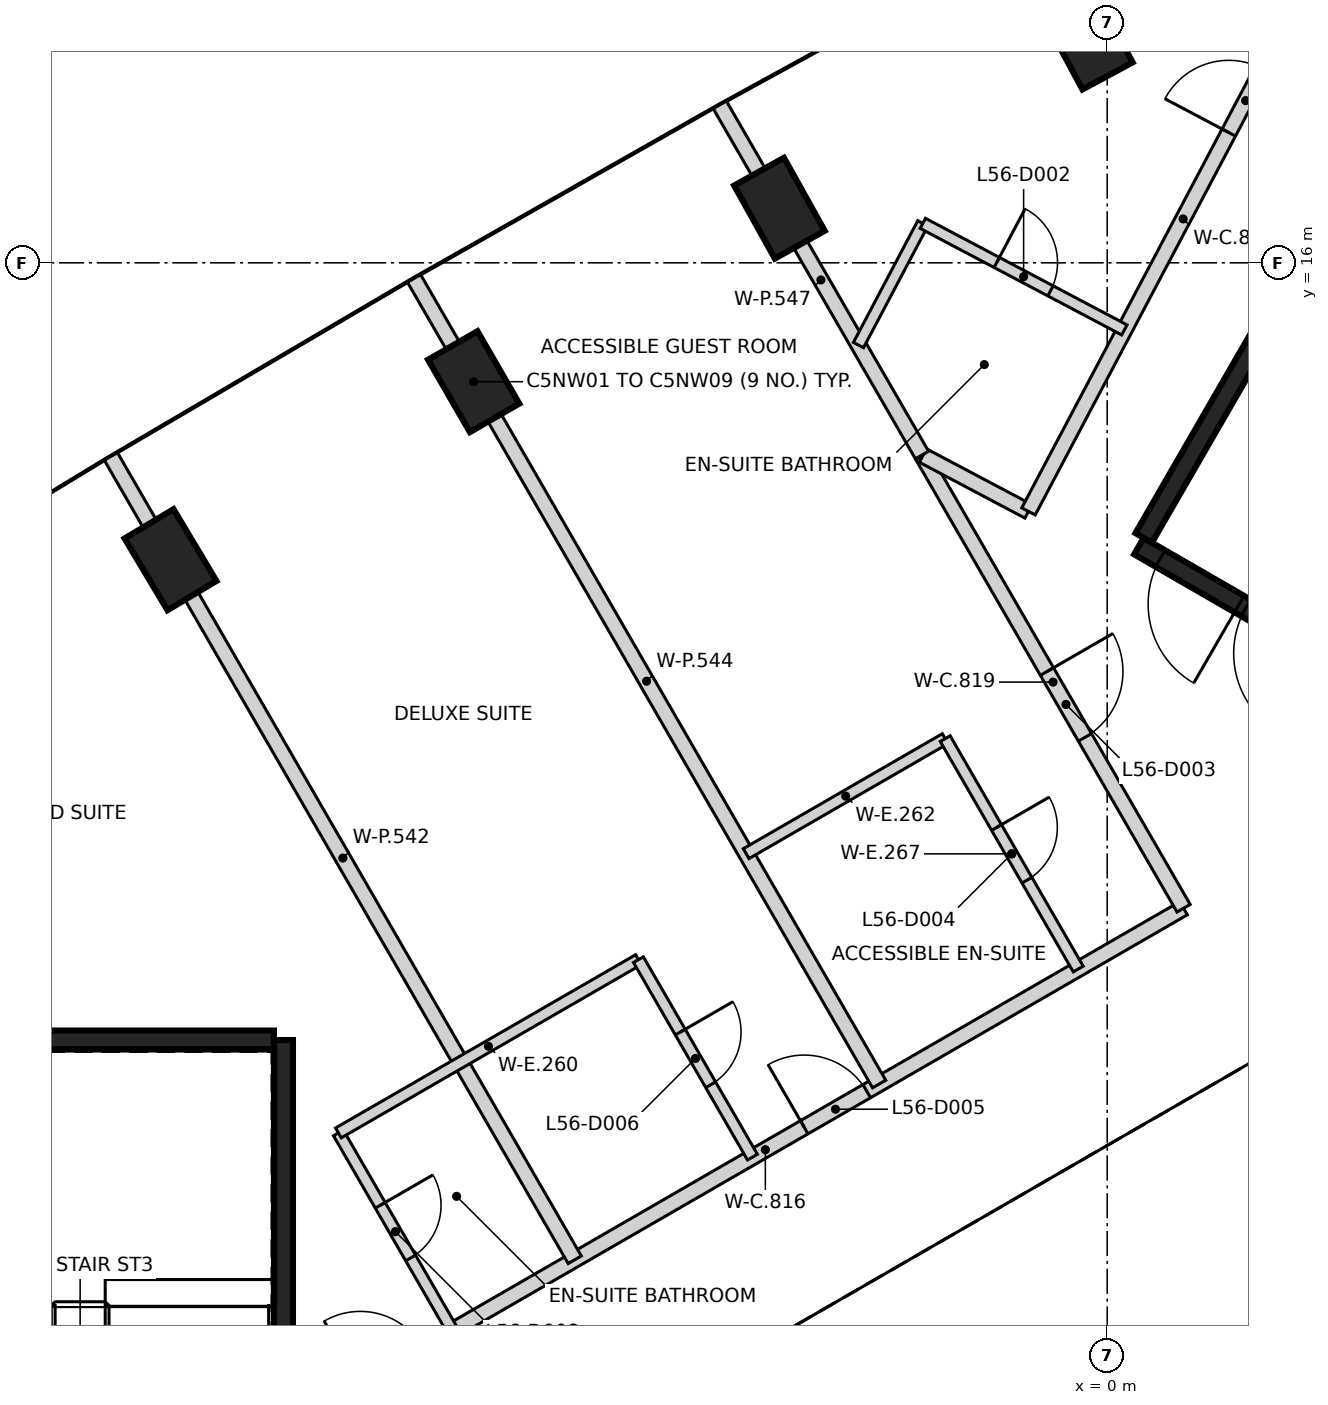
"""IFC4 building model, lengths in metres.
Left out: names, types, materials, properties, quantities, classifications, styles, units other than length and angle.
Written with IfcOpenShell. Run it as: python <this file> out.ifc"""

import sys

from ifc_helpers import new_model, si_unit, direction, frame, frame_2d, origin, origin_2d, place, context, subcontext, project, spatial, rectangle, extrude, element, fill, save


model = new_model("IFC4")
c1 = context("Model", 3, precision=1e-05, world=origin(), true_north=direction((0.0, 1.0)))
c2 = subcontext(c1, "Body", "Model", "MODEL_VIEW")
j1 = project(units=[si_unit("LENGTHUNIT", "METRE"), si_unit("PLANEANGLEUNIT", "RADIAN")], contexts=[c1])
p1 = place(None, origin())
s1 = spatial("IfcSite", under=j1, at=p1, CompositionType="ELEMENT")
p2 = place(p1, origin())
s2 = spatial("IfcBuilding", under=s1, at=p2, CompositionType="ELEMENT")
p3 = place(p2, frame((0.0, 0.0, 225.0)))
s3 = spatial("IfcBuildingStorey", under=s2, at=p3, CompositionType="ELEMENT", Elevation=225.0)
for number, where, z_axis, x_axis in (
    (1, (-0.256, 18.943, -0.35), (0.0, 0.0, 1.0), (-0.475, 0.88, 0.0)),
    (2, (-4.312, 16.719, -0.35), (0.0, 0.0, 1.0), (-0.487, 0.873, 0.0)),
    (3, (-8.335, 14.436, -0.35), (0.0, 0.0, 1.0), (-0.5, 0.866, 0.0)),
    (4, (-12.323, 12.094, -0.35), (0.0, 0.0, 1.0), (-0.513, 0.858, 0.0)),
):
    element("IfcColumn", number, at=place(p3, frame(where, z_axis=z_axis, x_axis=x_axis)), inside=s3, PredefinedType="COLUMN", context=c2, shape_type="SweptSolid", body=[
        extrude(rectangle(XDim=1.1, YDim=0.75, at=origin_2d()), origin(), (0.0, 0.0, 1.0), 3.6),
    ])
p4 = place(p3, frame((-10.837, 5.775, 0.0), z_axis=(0.0, 0.0, 1.0), x_axis=(0.0, -1.0, 0.0)))
e5 = element("IfcWall", 5, at=p4, inside=s3, PredefinedType="SHEAR", context=c2, shape_type="SweptSolid", body=[
    extrude(rectangle(XDim=11.55, YDim=0.25, at=frame_2d((5.775, 0.0))), origin(), (0.0, 0.0, 1.0), 3.25),
])
p5 = place(p4, frame((10.025, 0.0, 0.0)))
e6 = element("IfcOpeningElement", 6, at=p5, cuts=e5, PredefinedType="OPENING", context=c2, shape_type="SweptSolid", body=[
    extrude(rectangle(XDim=1.2, YDim=2.1, at=frame_2d((0.6, 1.05))), frame((0.0, 0.135, 0.0), z_axis=(0.0, -1.0, 0.0), x_axis=(1.0, 0.0, 0.0)), (0.0, 0.0, 1.0), 0.27),
])
p6 = place(p4, frame((8.725, 0.0, 0.0)))
e7 = element("IfcOpeningElement", 7, at=p6, cuts=e5, PredefinedType="OPENING", context=c2, shape_type="SweptSolid", body=[
    extrude(rectangle(XDim=1.2, YDim=2.1, at=frame_2d((0.6, 1.05))), frame((0.0, 0.135, 0.0), z_axis=(0.0, -1.0, 0.0), x_axis=(1.0, 0.0, 0.0)), (0.0, 0.0, 1.0), 0.27),
])
p7 = place(p3, frame((-16.472, 5.775, 0.0), z_axis=(0.0, 0.0, 1.0), x_axis=(1.0, 0.0, 0.0)))
e8 = element("IfcWall", 8, at=p7, inside=s3, PredefinedType="SHEAR", context=c2, shape_type="SweptSolid", body=[
    extrude(rectangle(XDim=5.51, YDim=0.25, at=frame_2d((2.755, 0.0))), origin(), (0.0, 0.0, 1.0), 3.25),
])
p8 = place(p3, frame((10.42, 6.498, 0.0), z_axis=(0.0, 0.0, 1.0), x_axis=(-0.866021906294, 0.500006057782, 0.0)))
e9 = element("IfcWall", 9, at=p8, inside=s3, PredefinedType="SHEAR", context=c2, shape_type="SweptSolid", body=[
    extrude(rectangle(XDim=11.55, YDim=0.25, at=frame_2d((5.775, 0.0))), origin(), (0.0, 0.0, 1.0), 3.25),
])
p9 = place(p8, frame((10.025, 0.0, 0.0)))
e10 = element("IfcOpeningElement", 10, at=p9, cuts=e9, PredefinedType="OPENING", context=c2, shape_type="SweptSolid", body=[
    extrude(rectangle(XDim=1.2, YDim=2.1, at=frame_2d((0.6, 1.05))), frame((0.0, 0.135, 0.0), z_axis=(0.0, -1.0, 0.0), x_axis=(1.0, 0.0, 0.0)), (0.0, 0.0, 1.0), 0.27),
])
p10 = place(p8, frame((8.725, 0.0, 0.0)))
e11 = element("IfcOpeningElement", 11, at=p10, cuts=e9, PredefinedType="OPENING", context=c2, shape_type="SweptSolid", body=[
    extrude(rectangle(XDim=1.2, YDim=2.1, at=frame_2d((0.6, 1.05))), frame((0.0, 0.135, 0.0), z_axis=(0.0, -1.0, 0.0), x_axis=(1.0, 0.0, 0.0)), (0.0, 0.0, 1.0), 0.27),
])
p11 = place(p3, frame((0.48, 12.381, 0.0), z_axis=(0.0, 0.0, 1.0), x_axis=(0.49999885962, 0.866026062182, 0.0)))
e12 = element("IfcWall", 12, at=p11, inside=s3, PredefinedType="SHEAR", context=c2, shape_type="SweptSolid", body=[
    extrude(rectangle(XDim=5.225, YDim=0.25, at=frame_2d((2.612, 0.0))), origin(), (0.0, 0.0, 1.0), 3.25),
])
p12 = place(p3, frame((-10.0, 1.155, 0.0), z_axis=(0.0, 0.0, 1.0), x_axis=(0.866014095592, 0.500019585852, 0.0)))
e13 = element("IfcWall", 13, at=p12, inside=s3, PredefinedType="PARTITIONING", context=c2, shape_type="SweptSolid", body=[
    extrude(rectangle(XDim=12.708, YDim=0.2, at=frame_2d((6.354, 0.0))), origin(), (0.0, 0.0, 1.0), 3.25),
])
p13 = place(p12, frame((6.944, 0.0, 0.0)))
e14 = element("IfcOpeningElement", 14, at=p13, cuts=e13, PredefinedType="OPENING", context=c2, shape_type="SweptSolid", body=[
    extrude(rectangle(XDim=0.95, YDim=2.1, at=frame_2d((0.475, 1.05))), frame((0.0, 0.11, 0.0), z_axis=(0.0, -1.0, 0.0), x_axis=(1.0, 0.0, 0.0)), (0.0, 0.0, 1.0), 0.22),
])
p14 = place(p12, frame((0.2, 0.0, 0.0)))
e15 = element("IfcOpeningElement", 15, at=p14, cuts=e13, PredefinedType="OPENING", context=c2, shape_type="SweptSolid", body=[
    extrude(rectangle(XDim=0.95, YDim=2.1, at=frame_2d((0.475, 1.05))), frame((0.0, 0.11, 0.0), z_axis=(0.0, -1.0, 0.0), x_axis=(1.0, 0.0, 0.0)), (0.0, 0.0, 1.0), 0.22),
])
p15 = place(p3, frame((-2.43, 13.459, 0.0), z_axis=(0.0, 0.0, 1.0), x_axis=(0.499957265187, -0.866050075334, 0.0)))
e16 = element("IfcWall", 16, at=p15, inside=s3, PredefinedType="PARTITIONING", context=c2, shape_type="SweptSolid", body=[
    extrude(rectangle(XDim=6.87, YDim=0.2, at=frame_2d((3.435, 0.0))), origin(), (0.0, 0.0, 1.0), 3.25),
])
p16 = place(p15, frame((3.275, 0.0, 0.0)))
e17 = element("IfcOpeningElement", 17, at=p16, cuts=e16, PredefinedType="OPENING", context=c2, shape_type="SweptSolid", body=[
    extrude(rectangle(XDim=1.0, YDim=2.1, at=frame_2d((0.5, 1.05))), frame((0.0, 0.11, 0.0), z_axis=(0.0, -1.0, 0.0), x_axis=(1.0, 0.0, 0.0)), (0.0, 0.0, 1.0), 0.22),
])
p17 = place(p3, frame((-2.425, 13.465, 0.0), z_axis=(0.0, 0.0, 1.0), x_axis=(0.883874806572, -0.467723557572, 0.0)))
e18 = element("IfcWall", 18, at=p17, inside=s3, PredefinedType="PARTITIONING", context=c2, shape_type="SweptSolid", body=[
    extrude(rectangle(XDim=1.572, YDim=0.2, at=frame_2d((0.786, 0.0))), origin(), (0.0, 0.0, 1.0), 3.25),
])
p18 = place(p3, frame((-1.035, 12.73, 0.0), z_axis=(0.0, 0.0, 1.0), x_axis=(0.46738248691, 0.884055208078, 0.0)))
e19 = element("IfcWall", 19, at=p18, inside=s3, PredefinedType="PARTITIONING", context=c2, shape_type="SweptSolid", body=[
    extrude(rectangle(XDim=8.705, YDim=0.2, at=frame_2d((4.352, 0.0))), origin(), (0.0, 0.0, 1.0), 3.25),
])
p19 = place(p18, frame((5.638, 0.0, 0.0)))
e20 = element("IfcOpeningElement", 20, at=p19, cuts=e19, PredefinedType="OPENING", context=c2, shape_type="SweptSolid", body=[
    extrude(rectangle(XDim=0.95, YDim=2.1, at=frame_2d((0.475, 1.05))), frame((0.0, 0.11, 0.0), z_axis=(0.0, -1.0, 0.0), x_axis=(1.0, 0.0, 0.0)), (0.0, 0.0, 1.0), 0.22),
])
p20 = place(p3, frame((-13.107, 13.453, 0.0), z_axis=(0.0, 0.0, 1.0), x_axis=(0.500037611077, -0.86600368793, 0.0)))
e21 = element("IfcWall", 21, at=p20, inside=s3, PredefinedType="PARTITIONING", context=c2, shape_type="SweptSolid", body=[
    extrude(rectangle(XDim=12.204, YDim=0.2, at=frame_2d((6.102, 0.0))), origin(), (0.0, 0.0, 1.0), 3.25),
])
p21 = place(p3, frame((-9.119, 15.795, 0.0), z_axis=(0.0, 0.0, 1.0), x_axis=(0.50001601051, -0.866016159915, 0.0)))
e22 = element("IfcWall", 22, at=p21, inside=s3, PredefinedType="PARTITIONING", context=c2, shape_type="SweptSolid", body=[
    extrude(rectangle(XDim=12.238, YDim=0.2, at=frame_2d((6.119, 0.0))), origin(), (0.0, 0.0, 1.0), 3.25),
])
p22 = place(p3, frame((-5.097, 18.078, 0.0), z_axis=(0.0, 0.0, 1.0), x_axis=(0.50004820116, -0.865997573043, 0.0)))
e23 = element("IfcWall", 23, at=p22, inside=s3, PredefinedType="PARTITIONING", context=c2, shape_type="SweptSolid", body=[
    extrude(rectangle(XDim=5.32, YDim=0.2, at=frame_2d((2.66, 0.0))), origin(), (0.0, 0.0, 1.0), 3.25),
])
p23 = place(p3, frame((-10.114, 4.553, 0.0), z_axis=(0.0, 0.0, 1.0), x_axis=(0.50002537861, -0.866010750942, 0.0)))
e24 = element("IfcWall", 24, at=p23, inside=s3, PredefinedType="PARTITIONING", context=c2, shape_type="SweptSolid", body=[
    extrude(rectangle(XDim=3.0, YDim=0.15, at=frame_2d((1.5, 0.0))), origin(), (0.0, 0.0, 1.0), 3.25),
])
p24 = place(p23, frame((1.1, 0.0, 0.0)))
e25 = element("IfcOpeningElement", 25, at=p24, cuts=e24, PredefinedType="OPENING", context=c2, shape_type="SweptSolid", body=[
    extrude(rectangle(XDim=0.8, YDim=2.1, at=frame_2d((0.4, 1.05))), frame((0.0, 0.085, 0.0), z_axis=(0.0, -1.0, 0.0), x_axis=(1.0, 0.0, 0.0)), (0.0, 0.0, 1.0), 0.17),
])
p25 = place(p3, frame((-10.114, 4.553, 0.0), z_axis=(0.0, 0.0, 1.0), x_axis=(0.866002713795, 0.500039298155, 0.0)))
e26 = element("IfcWall", 26, at=p25, inside=s3, PredefinedType="PARTITIONING", context=c2, shape_type="SweptSolid", body=[
    extrude(rectangle(XDim=4.558, YDim=0.15, at=frame_2d((2.279, 0.0))), origin(), (0.0, 0.0, 1.0), 3.25),
])
p26 = place(p3, frame((-6.167, 6.832, 0.0), z_axis=(0.0, 0.0, 1.0), x_axis=(0.499990139034, -0.866031096941, 0.0)))
e27 = element("IfcWall", 27, at=p26, inside=s3, PredefinedType="PARTITIONING", context=c2, shape_type="SweptSolid", body=[
    extrude(rectangle(XDim=3.0, YDim=0.15, at=frame_2d((1.5, 0.0))), origin(), (0.0, 0.0, 1.0), 3.25),
])
p27 = place(p26, frame((1.1, 0.0, 0.0)))
e28 = element("IfcOpeningElement", 28, at=p27, cuts=e27, PredefinedType="OPENING", context=c2, shape_type="SweptSolid", body=[
    extrude(rectangle(XDim=0.8, YDim=2.1, at=frame_2d((0.4, 1.05))), frame((0.0, 0.085, 0.0), z_axis=(0.0, -1.0, 0.0), x_axis=(1.0, 0.0, 0.0)), (0.0, 0.0, 1.0), 0.17),
])
p28 = place(p3, frame((-4.75, 8.227, 0.0), z_axis=(0.0, 0.0, 1.0), x_axis=(0.865893821749, 0.500227837548, 0.0)))
e29 = element("IfcWall", 29, at=p28, inside=s3, PredefinedType="PARTITIONING", context=c2, shape_type="SweptSolid", body=[
    extrude(rectangle(XDim=3.024, YDim=0.15, at=frame_2d((1.512, 0.0))), origin(), (0.0, 0.0, 1.0), 3.25),
])
p29 = place(p3, frame((-3.272, 14.918, 0.0), z_axis=(0.0, 0.0, 1.0), x_axis=(0.467162796658, 0.884171319043, 0.0)))
e30 = element("IfcWall", 30, at=p29, inside=s3, PredefinedType="PARTITIONING", context=c2, shape_type="SweptSolid", body=[
    extrude(rectangle(XDim=1.811, YDim=0.15, at=frame_2d((0.905, 0.0))), origin(), (0.0, 0.0, 1.0), 3.25),
])
p30 = place(p3, frame((-2.426, 16.519, 0.0), z_axis=(0.0, 0.0, 1.0), x_axis=(0.884056991815, -0.467379112952, 0.0)))
e31 = element("IfcWall", 31, at=p30, inside=s3, PredefinedType="PARTITIONING", context=c2, shape_type="SweptSolid", body=[
    extrude(rectangle(XDim=3.0, YDim=0.15, at=frame_2d((1.5, 0.0))), origin(), (0.0, 0.0, 1.0), 3.25),
])
p31 = place(p30, frame((1.1, 0.0, 0.0)))
e32 = element("IfcOpeningElement", 32, at=p31, cuts=e31, PredefinedType="OPENING", context=c2, shape_type="SweptSolid", body=[
    extrude(rectangle(XDim=0.8, YDim=2.1, at=frame_2d((0.4, 1.05))), frame((0.0, 0.085, 0.0), z_axis=(0.0, -1.0, 0.0), x_axis=(1.0, 0.0, 0.0)), (0.0, 0.0, 1.0), 0.17),
])
p32 = place(p3, frame((-2.131, 9.74, 0.0), z_axis=(0.0, 0.0, 1.0), x_axis=(0.500010275428, -0.866019471182, 0.0)))
e33 = element("IfcWall", 33, at=p32, inside=s3, PredefinedType="PARTITIONING", context=c2, shape_type="SweptSolid", body=[
    extrude(rectangle(XDim=3.5, YDim=0.15, at=frame_2d((1.75, 0.0))), origin(), (0.0, 0.0, 1.0), 3.25),
])
p33 = place(p32, frame((1.35, 0.0, 0.0)))
e34 = element("IfcOpeningElement", 34, at=p33, cuts=e33, PredefinedType="OPENING", context=c2, shape_type="SweptSolid", body=[
    extrude(rectangle(XDim=0.8, YDim=2.1, at=frame_2d((0.4, 1.05))), frame((0.0, 0.085, 0.0), z_axis=(0.0, -1.0, 0.0), x_axis=(1.0, 0.0, 0.0)), (0.0, 0.0, 1.0), 0.17),
])
p34 = place(p9, origin())
e35 = element("IfcDoor", 35, at=p34, inside=s3, OperationType="SINGLE_SWING_LEFT", PredefinedType="DOOR", context=c2, shape_type="SweptSolid", body=[
    extrude(rectangle(XDim=1.2, YDim=2.1, at=frame_2d((0.6, 1.05))), frame((0.0, 0.025, 0.0), z_axis=(0.0, -1.0, 0.0), x_axis=(1.0, 0.0, 0.0)), (0.0, 0.0, 1.0), 0.05),
])
fill(e10, e35)
p35 = place(p10, origin())
e36 = element("IfcDoor", 36, at=p35, inside=s3, OperationType="SINGLE_SWING_RIGHT", PredefinedType="DOOR", context=c2, shape_type="SweptSolid", body=[
    extrude(rectangle(XDim=1.2, YDim=2.1, at=frame_2d((0.6, 1.05))), frame((0.0, 0.025, 0.0), z_axis=(0.0, -1.0, 0.0), x_axis=(1.0, 0.0, 0.0)), (0.0, 0.0, 1.0), 0.05),
])
fill(e11, e36)
p36 = place(p19, frame((0.95, 0.0, 0.0), z_axis=(0.0, 0.0, 1.0), x_axis=(-1.0, 0.0, 0.0)))
e37 = element("IfcDoor", 37, at=p36, inside=s3, OperationType="SINGLE_SWING_LEFT", PredefinedType="DOOR", context=c2, shape_type="SweptSolid", body=[
    extrude(rectangle(XDim=0.95, YDim=2.1, at=frame_2d((0.475, 1.05))), frame((0.0, 0.025, 0.0), z_axis=(0.0, -1.0, 0.0), x_axis=(1.0, 0.0, 0.0)), (0.0, 0.0, 1.0), 0.05),
])
fill(e20, e37)
p37 = place(p31, origin())
e38 = element("IfcDoor", 38, at=p37, inside=s3, OperationType="SINGLE_SWING_LEFT", PredefinedType="DOOR", context=c2, shape_type="SweptSolid", body=[
    extrude(rectangle(XDim=0.8, YDim=2.1, at=frame_2d((0.4, 1.05))), frame((0.0, 0.025, 0.0), z_axis=(0.0, -1.0, 0.0), x_axis=(1.0, 0.0, 0.0)), (0.0, 0.0, 1.0), 0.05),
])
fill(e32, e38)
p38 = place(p16, frame((1.0, 0.0, 0.0), z_axis=(0.0, 0.0, 1.0), x_axis=(-1.0, 0.0, 0.0)))
e39 = element("IfcDoor", 39, at=p38, inside=s3, OperationType="SINGLE_SWING_LEFT", PredefinedType="DOOR", context=c2, shape_type="SweptSolid", body=[
    extrude(rectangle(XDim=1.0, YDim=2.1, at=frame_2d((0.5, 1.05))), frame((0.0, 0.025, 0.0), z_axis=(0.0, -1.0, 0.0), x_axis=(1.0, 0.0, 0.0)), (0.0, 0.0, 1.0), 0.05),
])
fill(e17, e39)
p39 = place(p33, frame((0.8, 0.0, 0.0), z_axis=(0.0, 0.0, 1.0), x_axis=(-1.0, 0.0, 0.0)))
e40 = element("IfcDoor", 40, at=p39, inside=s3, OperationType="SINGLE_SWING_LEFT", PredefinedType="DOOR", context=c2, shape_type="SweptSolid", body=[
    extrude(rectangle(XDim=0.8, YDim=2.1, at=frame_2d((0.4, 1.05))), frame((0.0, 0.025, 0.0), z_axis=(0.0, -1.0, 0.0), x_axis=(1.0, 0.0, 0.0)), (0.0, 0.0, 1.0), 0.05),
])
fill(e34, e40)
p40 = place(p13, origin())
e41 = element("IfcDoor", 41, at=p40, inside=s3, OperationType="SINGLE_SWING_LEFT", PredefinedType="DOOR", context=c2, shape_type="SweptSolid", body=[
    extrude(rectangle(XDim=0.95, YDim=2.1, at=frame_2d((0.475, 1.05))), frame((0.0, 0.025, 0.0), z_axis=(0.0, -1.0, 0.0), x_axis=(1.0, 0.0, 0.0)), (0.0, 0.0, 1.0), 0.05),
])
fill(e14, e41)
p41 = place(p27, frame((0.8, 0.0, 0.0), z_axis=(0.0, 0.0, 1.0), x_axis=(-1.0, 0.0, 0.0)))
e42 = element("IfcDoor", 42, at=p41, inside=s3, OperationType="SINGLE_SWING_LEFT", PredefinedType="DOOR", context=c2, shape_type="SweptSolid", body=[
    extrude(rectangle(XDim=0.8, YDim=2.1, at=frame_2d((0.4, 1.05))), frame((0.0, 0.025, 0.0), z_axis=(0.0, -1.0, 0.0), x_axis=(1.0, 0.0, 0.0)), (0.0, 0.0, 1.0), 0.05),
])
fill(e28, e42)
p42 = place(p24, frame((0.8, 0.0, 0.0), z_axis=(0.0, 0.0, 1.0), x_axis=(-1.0, 0.0, 0.0)))
e43 = element("IfcDoor", 43, at=p42, inside=s3, OperationType="SINGLE_SWING_LEFT", PredefinedType="DOOR", context=c2, shape_type="SweptSolid", body=[
    extrude(rectangle(XDim=0.8, YDim=2.1, at=frame_2d((0.4, 1.05))), frame((0.0, 0.025, 0.0), z_axis=(0.0, -1.0, 0.0), x_axis=(1.0, 0.0, 0.0)), (0.0, 0.0, 1.0), 0.05),
])
fill(e25, e43)
save(model, sys.argv[1])
